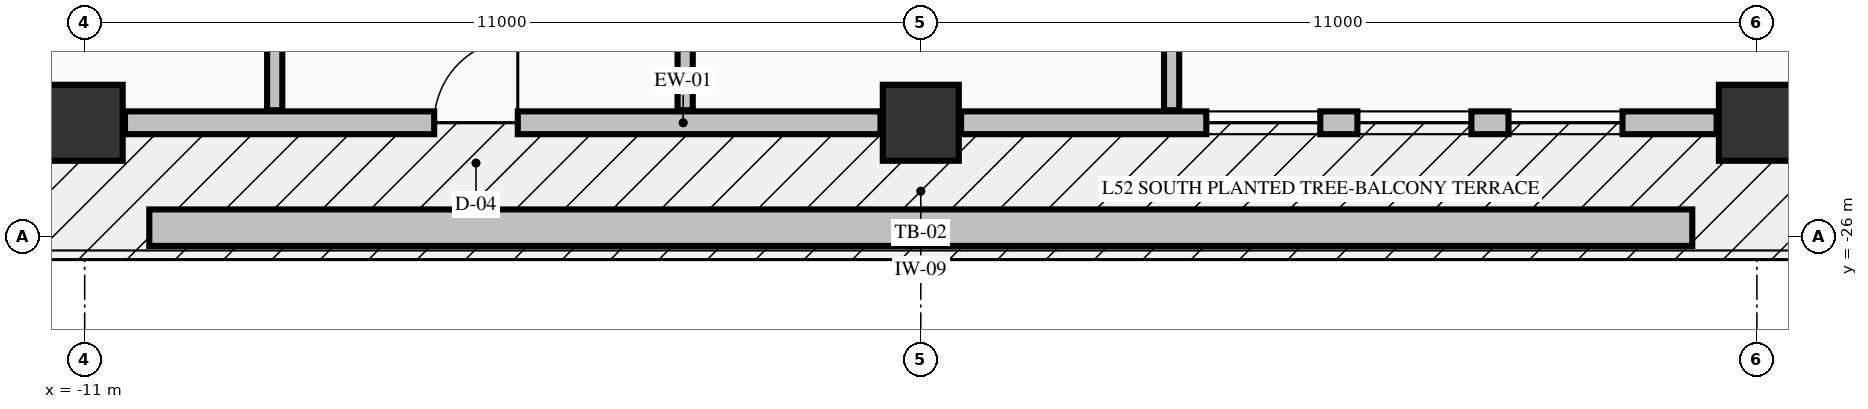
"""IFC4 building model, lengths in metres.
Left out: names, types, materials, properties, quantities, classifications, styles, units other than length and angle.
Written with IfcOpenShell. Run it as: python <this file> out.ifc"""

import sys

from ifc_helpers import new_model, si_unit, direction, frame, frame_2d, origin, origin_2d, place, context, subcontext, project, spatial, rectangle, extrude, element, fill, save


model = new_model("IFC4")
c1 = context("Model", 3, precision=1e-05, world=origin(), true_north=direction((0.0, 1.0)))
c2 = subcontext(c1, "Body", "Model", "MODEL_VIEW")
j1 = project(units=[si_unit("LENGTHUNIT", "METRE"), si_unit("PLANEANGLEUNIT", "RADIAN")], contexts=[c1])
p1 = place(None, origin())
s1 = spatial("IfcSite", under=j1, at=p1, CompositionType="ELEMENT")
p2 = place(p1, origin())
s2 = spatial("IfcBuilding", under=s1, at=p2, CompositionType="ELEMENT")
p3 = place(p2, frame((0.0, 0.0, 201.66)))
s3 = spatial("IfcBuildingStorey", under=s2, at=p3, CompositionType="ELEMENT", Elevation=201.66)
for number, where, z_axis, x_axis in (
    (1, (-11.0, -24.5, -0.25), (0.0, 0.0, 1.0), (1.0, 0.0, 0.0)),
    (2, (0.0, -24.5, -0.25), (0.0, 0.0, 1.0), (1.0, 0.0, 0.0)),
    (3, (11.0, -24.5, -0.25), (0.0, 0.0, 1.0), (1.0, 0.0, 0.0)),
):
    element("IfcColumn", number, at=place(p3, frame(where, z_axis=z_axis, x_axis=x_axis)), inside=s3, PredefinedType="COLUMN", context=c2, shape_type="SweptSolid", body=[
        extrude(rectangle(XDim=1.0, YDim=1.0, at=origin_2d()), origin(), (0.0, 0.0, 1.0), 3.4),
    ])
p4 = place(p3, frame((-10.47, -24.5, 0.0), z_axis=(0.0, 0.0, 1.0), x_axis=(1.0, 0.0, 0.0)))
e4 = element("IfcWall", 4, at=p4, inside=s3, PredefinedType="STANDARD", context=c2, shape_type="SweptSolid", body=[
    extrude(rectangle(XDim=9.94, YDim=0.3, at=frame_2d((4.97, 0.0))), origin(), (0.0, 0.0, 1.0), 2.542),
])
p5 = place(p4, frame((4.068, 0.0, 0.0)))
e5 = element("IfcOpeningElement", 5, at=p5, cuts=e4, PredefinedType="OPENING", context=c2, shape_type="SweptSolid", body=[
    extrude(rectangle(XDim=1.1, YDim=2.15, at=frame_2d((0.55, 1.075))), frame((0.0, 0.16, 0.0), z_axis=(0.0, -1.0, 0.0), x_axis=(1.0, 0.0, 0.0)), (0.0, 0.0, 1.0), 0.32),
])
p6 = place(p3, frame((0.53, -24.5, 0.0), z_axis=(0.0, 0.0, 1.0), x_axis=(1.0, 0.0, 0.0)))
e6 = element("IfcWall", 6, at=p6, inside=s3, PredefinedType="STANDARD", context=c2, shape_type="SweptSolid", body=[
    extrude(rectangle(XDim=9.94, YDim=0.3, at=frame_2d((4.97, 0.0))), origin(), (0.0, 0.0, 1.0), 2.542),
])
p7 = place(p6, frame((3.226, 0.0, 0.72)))
e7 = element("IfcOpeningElement", 7, at=p7, cuts=e6, PredefinedType="OPENING", context=c2, shape_type="SweptSolid", body=[
    extrude(rectangle(XDim=1.5, YDim=1.6, at=frame_2d((0.75, 0.8))), frame((0.0, 0.16, 0.0), z_axis=(0.0, -1.0, 0.0), x_axis=(1.0, 0.0, 0.0)), (0.0, 0.0, 1.0), 0.32),
])
p8 = place(p6, frame((5.214, 0.0, 0.72)))
e8 = element("IfcOpeningElement", 8, at=p8, cuts=e6, PredefinedType="OPENING", context=c2, shape_type="SweptSolid", body=[
    extrude(rectangle(XDim=1.5, YDim=1.6, at=frame_2d((0.75, 0.8))), frame((0.0, 0.16, 0.0), z_axis=(0.0, -1.0, 0.0), x_axis=(1.0, 0.0, 0.0)), (0.0, 0.0, 1.0), 0.32),
])
p9 = place(p6, frame((7.202, 0.0, 0.72)))
e9 = element("IfcOpeningElement", 9, at=p9, cuts=e6, PredefinedType="OPENING", context=c2, shape_type="SweptSolid", body=[
    extrude(rectangle(XDim=1.5, YDim=1.6, at=frame_2d((0.75, 0.8))), frame((0.0, 0.16, 0.0), z_axis=(0.0, -1.0, 0.0), x_axis=(1.0, 0.0, 0.0)), (0.0, 0.0, 1.0), 0.32),
])
p10 = place(p3, frame((-8.5, -24.335, 0.0), z_axis=(0.0, 0.0, 1.0), x_axis=(0.0, 1.0, 0.0)))
e10 = element("IfcWall", 10, at=p10, inside=s3, PredefinedType="PARTITIONING", context=c2, shape_type="SweptSolid", body=[
    extrude(rectangle(XDim=8.907, YDim=0.2, at=frame_2d((4.454, 0.0))), origin(), (0.0, 0.0, 1.0), 3.15),
])
p11 = place(p3, frame((-3.1, -24.335, 0.0), z_axis=(0.0, 0.0, 1.0), x_axis=(0.0, 1.0, 0.0)))
e11 = element("IfcWall", 11, at=p11, inside=s3, PredefinedType="PARTITIONING", context=c2, shape_type="SweptSolid", body=[
    extrude(rectangle(XDim=8.207, YDim=0.2, at=frame_2d((4.104, 0.0))), origin(), (0.0, 0.0, 1.0), 3.15),
])
p12 = place(p3, frame((3.3, -24.335, 0.0), z_axis=(0.0, 0.0, 1.0), x_axis=(0.0, 1.0, 0.0)))
e12 = element("IfcWall", 12, at=p12, inside=s3, PredefinedType="PARTITIONING", context=c2, shape_type="SweptSolid", body=[
    extrude(rectangle(XDim=8.907, YDim=0.2, at=frame_2d((4.454, 0.0))), origin(), (0.0, 0.0, 1.0), 3.15),
])
p13 = place(p3, frame((-10.15, -25.88, -0.04), z_axis=(0.0, 0.0, 1.0), x_axis=(1.0, 0.0, 0.0)))
e13 = element("IfcWall", 13, at=p13, inside=s3, PredefinedType="PARAPET", context=c2, shape_type="SweptSolid", body=[
    extrude(rectangle(XDim=20.3, YDim=0.48, at=frame_2d((10.15, 0.0))), origin(), (0.0, 0.0, 1.0), 0.52),
])
p14 = place(p5, origin())
e14 = element("IfcDoor", 14, at=p14, inside=s3, OperationType="SINGLE_SWING_RIGHT", PredefinedType="DOOR", context=c2, shape_type="SweptSolid", body=[
    extrude(rectangle(XDim=1.1, YDim=2.15, at=frame_2d((0.55, 1.075))), frame((0.0, 0.025, 0.0), z_axis=(0.0, -1.0, 0.0), x_axis=(1.0, 0.0, 0.0)), (0.0, 0.0, 1.0), 0.05),
])
fill(e5, e14)
p15 = place(p7, origin())
e15 = element("IfcWindow", 15, at=p15, inside=s3, PartitioningType="SINGLE_PANEL", PredefinedType="WINDOW", context=c2, shape_type="SweptSolid", body=[
    extrude(rectangle(XDim=1.5, YDim=1.6, at=frame_2d((0.75, 0.8))), frame((0.0, 0.03, 0.0), z_axis=(0.0, -1.0, 0.0), x_axis=(1.0, 0.0, 0.0)), (0.0, 0.0, 1.0), 0.06),
])
fill(e7, e15)
p16 = place(p8, origin())
e16 = element("IfcWindow", 16, at=p16, inside=s3, PartitioningType="SINGLE_PANEL", PredefinedType="WINDOW", context=c2, shape_type="SweptSolid", body=[
    extrude(rectangle(XDim=1.5, YDim=1.6, at=frame_2d((0.75, 0.8))), frame((0.0, 0.03, 0.0), z_axis=(0.0, -1.0, 0.0), x_axis=(1.0, 0.0, 0.0)), (0.0, 0.0, 1.0), 0.06),
])
fill(e8, e16)
p17 = place(p9, origin())
e17 = element("IfcWindow", 17, at=p17, inside=s3, PartitioningType="SINGLE_PANEL", PredefinedType="WINDOW", context=c2, shape_type="SweptSolid", body=[
    extrude(rectangle(XDim=1.5, YDim=1.6, at=frame_2d((0.75, 0.8))), frame((0.0, 0.03, 0.0), z_axis=(0.0, -1.0, 0.0), x_axis=(1.0, 0.0, 0.0)), (0.0, 0.0, 1.0), 0.06),
])
fill(e9, e17)
save(model, sys.argv[1])
